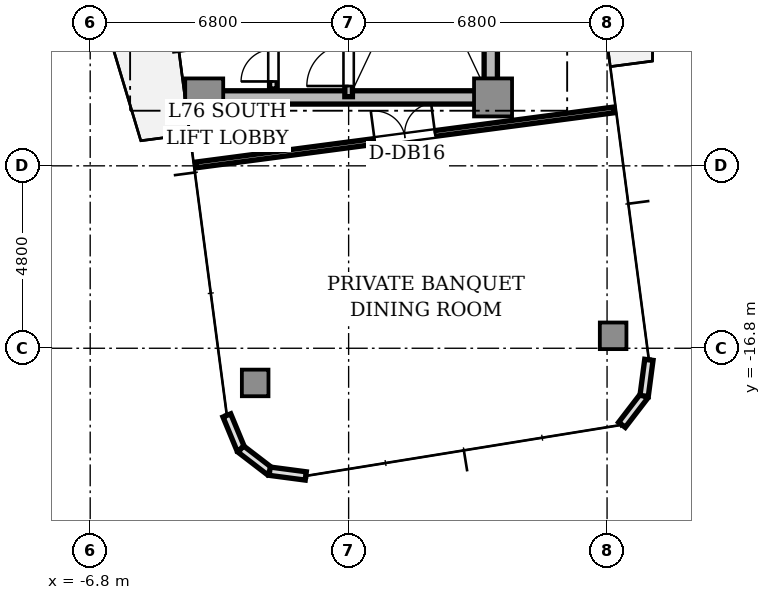
"""IFC4 building model, lengths in metres.
Left out: names, types, materials, properties, quantities, classifications, styles, units other than length and angle.
Written with IfcOpenShell. Run it as: python <this file> out.ifc"""

import sys

from ifc_helpers import new_model, si_unit, direction, frame, frame_2d, origin, origin_2d, place, context, subcontext, project, spatial, rectangle, extrude, source, transform, mapped, element, fill, save


model = new_model("IFC4")
c1 = context("Model", 3, precision=1e-05, world=origin(), true_north=direction((0.0, 1.0)))
c2 = subcontext(c1, "Body", "Model", "MODEL_VIEW")
j1 = project(units=[si_unit("LENGTHUNIT", "METRE"), si_unit("PLANEANGLEUNIT", "RADIAN")], contexts=[c1])
p1 = place(None, origin())
s1 = spatial("IfcSite", under=j1, at=p1, CompositionType="ELEMENT")
p2 = place(p1, origin())
s2 = spatial("IfcBuilding", under=s1, at=p2, CompositionType="ELEMENT")
p3 = place(p2, frame((0.0, 0.0, 272.45)))
s3 = spatial("IfcBuildingStorey", under=s2, at=p3, CompositionType="ELEMENT", Elevation=272.45)
p4 = place(p3, frame((-3.55, -10.2, 0.0), z_axis=(0.0, 0.0, 1.0), x_axis=(1.0, 0.0, 0.0)))
e1 = element("IfcWall", 1, at=p4, inside=s3, PredefinedType="SHEAR", context=c2, shape_type="SweptSolid", body=[
    extrude(rectangle(XDim=7.1, YDim=0.35, at=frame_2d((3.55, 0.0))), origin(), (0.0, 0.0, 1.0), 3.11),
])
p5 = place(p3, frame((3.74, -9.75, 0.0), z_axis=(0.0, 0.0, 1.0), x_axis=(0.0, 1.0, 0.0)))
e2 = element("IfcWall", 2, at=p5, inside=s3, PredefinedType="SHEAR", context=c2, shape_type="SweptSolid", body=[
    extrude(rectangle(XDim=6.9, YDim=0.35, at=frame_2d((3.45, 0.0))), origin(), (0.0, 0.0, 1.0), 3.11),
])
m1 = source(origin(), c2, "Body", "SweptSolid", [
    extrude(rectangle(XDim=1.0, YDim=1.0, at=origin_2d()), origin(), (0.0, 0.0, 1.0), 3.11),
])
for number, where, z_axis, x_axis in (
    (3, (-3.8, -10.2, 0.0), (0.0, 0.0, 1.0), (1.0, 0.0, 0.0)),
    (4, (3.8, -10.2, 0.0), (0.0, 0.0, 1.0), (1.0, 0.0, 0.0)),
):
    element("IfcColumn", number, at=place(p3, frame(where, z_axis=z_axis, x_axis=x_axis)), inside=s3, PredefinedType="COLUMN", context=c2, shape_type="MappedRepresentation", body=[
        mapped(m1, transform((0.0, 0.0, 0.0), scale=1.0)),
    ])
m2 = source(origin(), c2, "Body", "SweptSolid", [
    extrude(rectangle(XDim=0.7, YDim=0.7, at=origin_2d()), origin(), (0.0, 0.0, 1.0), 3.11),
])
for number, where, z_axis, x_axis in (
    (5, (-2.459, -17.712, 0.0), (0.0, 0.0, 1.0), (1.0, 0.0, 0.0)),
    (6, (6.96, -16.472, 0.0), (0.0, 0.0, 1.0), (1.0, 0.0, 0.0)),
):
    element("IfcColumn", number, at=place(p3, frame(where, z_axis=z_axis, x_axis=x_axis)), inside=s3, PredefinedType="COLUMN", context=c2, shape_type="MappedRepresentation", body=[
        mapped(m2, transform((0.0, 0.0, 0.0), scale=1.0)),
    ])
p6 = place(p3, frame((-3.204, -18.567, 0.0), z_axis=(0.0, 0.0, 1.0), x_axis=(0.382569397359, -0.923926759112, 0.0)))
e7 = element("IfcWall", 7, at=p6, inside=s3, PredefinedType="STANDARD", context=c2, shape_type="SweptSolid", body=[
    extrude(rectangle(XDim=0.958, YDim=0.22, at=frame_2d((0.479, 0.0))), origin(), (0.0, 0.0, 1.0), 3.11),
])
for number, where, z_axis, x_axis in (
    (8, (-2.837, -19.452, 0.0), (0.0, 0.0, 1.0), (0.793, -0.609, 0.0)),
    (9, (-2.078, -20.035, 0.0), (0.0, 0.0, 1.0), (0.991, -0.131, 0.0)),
    (10, (7.192, -18.814, 0.0), (0.0, 0.0, 1.0), (0.609, 0.793, 0.0)),
):
    element("IfcWall", number, at=place(p3, frame(where, z_axis=z_axis, x_axis=x_axis)), inside=s3, PredefinedType="STANDARD", context=c2, shape_type="SweptSolid", body=[
        extrude(rectangle(XDim=0.958, YDim=0.22, at=frame_2d((0.479, 0.0))), origin(), (0.0, 0.0, 1.0), 3.11),
    ])
p7 = place(p3, frame((7.775, -18.055, 0.0), z_axis=(0.0, 0.0, 1.0), x_axis=(0.130494070426, 0.991449089759, 0.0)))
e11 = element("IfcWall", 11, at=p7, inside=s3, PredefinedType="STANDARD", context=c2, shape_type="SweptSolid", body=[
    extrude(rectangle(XDim=0.958, YDim=0.22, at=frame_2d((0.479, 0.0))), origin(), (0.0, 0.0, 1.0), 3.11),
])
p8 = place(p3, frame((0.0, -10.18, 0.0), z_axis=(0.0, 0.0, 1.0), x_axis=(0.0, 1.0, 0.0)))
e12 = element("IfcWall", 12, at=p8, inside=s3, PredefinedType="SOLIDWALL", context=c2, shape_type="SweptSolid", body=[
    extrude(rectangle(XDim=7.68, YDim=0.2, at=frame_2d((3.84, 0.0))), origin(), (0.0, 0.0, 1.0), 3.11),
])
p9 = place(p8, frame((0.28, 0.0, 0.0)))
e13 = element("IfcOpeningElement", 13, at=p9, cuts=e12, PredefinedType="OPENING", context=c2, shape_type="SweptSolid", body=[
    extrude(rectangle(XDim=1.1, YDim=2.15, at=frame_2d((0.55, 1.075))), frame((0.0, 0.11, 0.0), z_axis=(0.0, -1.0, 0.0), x_axis=(1.0, 0.0, 0.0)), (0.0, 0.0, 1.0), 0.22),
])
p10 = place(p3, frame((-1.98, -9.98, 0.0), z_axis=(0.0, 0.0, 1.0), x_axis=(0.0, 1.0, 0.0)))
e14 = element("IfcWall", 14, at=p10, inside=s3, PredefinedType="SOLIDWALL", context=c2, shape_type="SweptSolid", body=[
    extrude(rectangle(XDim=4.66, YDim=0.2, at=frame_2d((2.33, 0.0))), origin(), (0.0, 0.0, 1.0), 2.66),
])
p11 = place(p10, frame((0.2, 0.0, 0.0)))
e15 = element("IfcOpeningElement", 15, at=p11, cuts=e14, PredefinedType="OPENING", context=c2, shape_type="SweptSolid", body=[
    extrude(rectangle(XDim=0.85, YDim=2.1, at=frame_2d((0.425, 1.05))), frame((0.0, 0.11, 0.0), z_axis=(0.0, -1.0, 0.0), x_axis=(1.0, 0.0, 0.0)), (0.0, 0.0, 1.0), 0.22),
])
p12 = place(p3, frame((-4.021, -11.977, 0.0), z_axis=(0.0, 0.0, 1.0), x_axis=(0.991445908749, 0.130518236368, 0.0)))
e16 = element("IfcWall", 16, at=p12, inside=s3, PredefinedType="PARTITIONING", context=c2, shape_type="SweptSolid", body=[
    extrude(rectangle(XDim=11.1, YDim=0.15, at=frame_2d((5.55, 0.0))), origin(), (0.0, 0.0, 1.0), 2.66),
])
p13 = place(p12, frame((4.75, 0.0, 0.0)))
e17 = element("IfcOpeningElement", 17, at=p13, cuts=e16, PredefinedType="OPENING", context=c2, shape_type="SweptSolid", body=[
    extrude(rectangle(XDim=1.6, YDim=2.25, at=frame_2d((0.8, 1.125))), frame((0.0, 0.085, 0.0), z_axis=(0.0, -1.0, 0.0), x_axis=(1.0, 0.0, 0.0)), (0.0, 0.0, 1.0), 0.17),
])
m3 = source(origin(), c2, "Body", "SweptSolid", [
    extrude(rectangle(XDim=1.1, YDim=0.05, at=origin_2d()), origin(), (0.0, 0.0, 1.0), 2.15),
])
p14 = place(p9, frame((0.55, 0.0, 0.0)))
e18 = element("IfcDoor", 18, at=p14, inside=s3, OperationType="SINGLE_SWING_LEFT", PredefinedType="DOOR", context=c2, shape_type="MappedRepresentation", body=[
    mapped(m3, transform((0.0, 0.0, 0.0), scale=1.0)),
])
fill(e13, e18)
m4 = source(origin(), c2, "Body", "SweptSolid", [
    extrude(rectangle(XDim=0.85, YDim=0.05, at=origin_2d()), origin(), (0.0, 0.0, 1.0), 2.1),
])
p15 = place(p11, frame((0.425, 0.0, 0.0)))
e19 = element("IfcDoor", 19, at=p15, inside=s3, OperationType="SINGLE_SWING_LEFT", PredefinedType="DOOR", context=c2, shape_type="MappedRepresentation", body=[
    mapped(m4, transform((0.0, 0.0, 0.0), scale=1.0)),
])
fill(e15, e19)
m5 = source(origin(), c2, "Body", "SweptSolid", [
    extrude(rectangle(XDim=1.6, YDim=0.05, at=origin_2d()), origin(), (0.0, 0.0, 1.0), 2.25),
])
p16 = place(p13, frame((0.8, 0.0, 0.0)))
e20 = element("IfcDoor", 20, at=p16, inside=s3, OperationType="DOUBLE_DOOR_SINGLE_SWING", PredefinedType="DOOR", context=c2, shape_type="MappedRepresentation", body=[
    mapped(m5, transform((0.0, 0.0, 0.0), scale=1.0)),
])
fill(e17, e20)
save(model, sys.argv[1])
